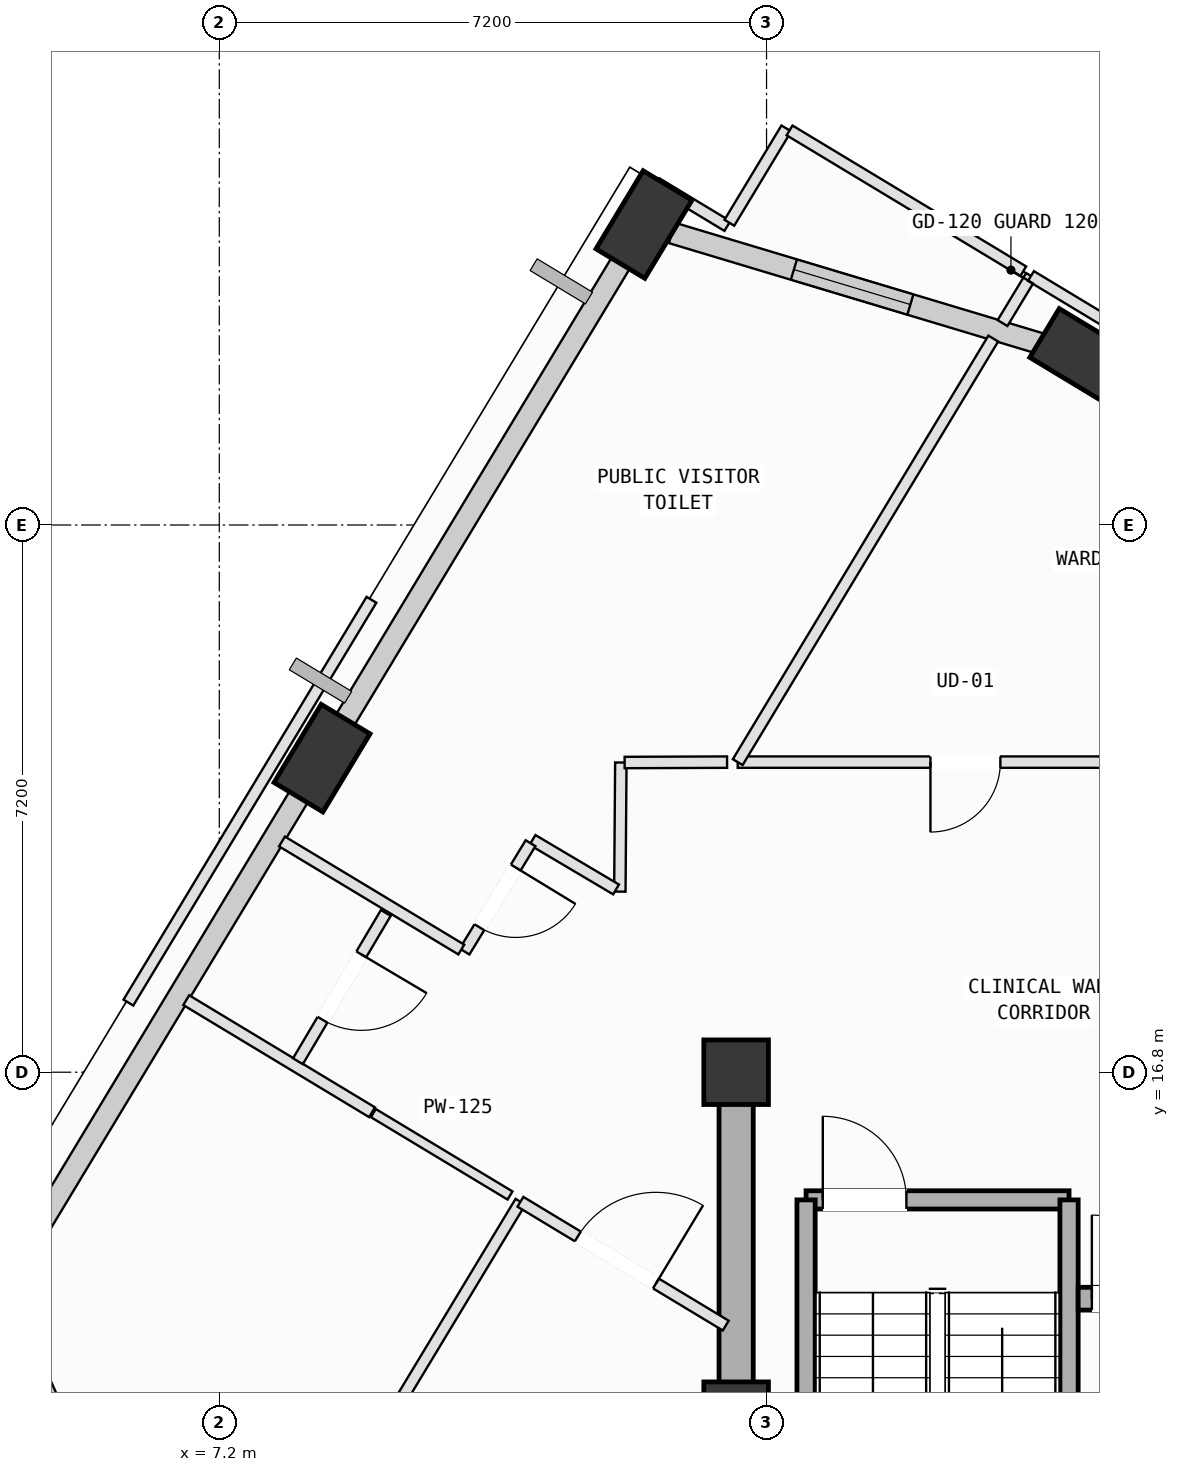
"""IFC4 building model, lengths in metres.
Left out: names, types, materials, properties, quantities, classifications, styles, units other than length and angle.
Written with IfcOpenShell. Run it as: python <this file> out.ifc"""

import sys

from ifc_helpers import new_model, si_unit, direction, frame, frame_2d, origin, origin_2d, place, context, subcontext, project, spatial, rectangle, extrude, element, fill, save


model = new_model("IFC4")
c1 = context("Model", 3, precision=1e-05, world=origin(), true_north=direction((0.0, 1.0)))
c2 = subcontext(c1, "Body", "Model", "MODEL_VIEW")
j1 = project(units=[si_unit("LENGTHUNIT", "METRE"), si_unit("PLANEANGLEUNIT", "RADIAN")], contexts=[c1])
p1 = place(None, origin())
s1 = spatial("IfcSite", under=j1, at=p1, CompositionType="ELEMENT")
p2 = place(p1, origin())
s2 = spatial("IfcBuilding", under=s1, at=p2, CompositionType="ELEMENT")
p3 = place(p2, frame((0.0, 0.0, 276.6)))
s3 = spatial("IfcBuildingStorey", under=s2, at=p3, CompositionType="ELEMENT", Elevation=276.6)
for number, where, z_axis, x_axis in (
    (1, (14.0, 12.3, 0.0), (0.0, 0.0, 1.0), (1.0, 0.0, 0.0)),
    (2, (14.0, 16.8, 0.0), (0.0, 0.0, 1.0), (1.0, 0.0, 0.0)),
):
    element("IfcColumn", number, at=place(p3, frame(where, z_axis=z_axis, x_axis=x_axis)), inside=s3, PredefinedType="COLUMN", context=c2, shape_type="SweptSolid", body=[
        extrude(rectangle(XDim=0.85, YDim=0.85, at=origin_2d()), origin(), (0.0, 0.0, 1.0), 4.0),
    ])
p4 = place(p3, frame((18.572, 26.216, 0.002), z_axis=(-0.005365511084, -0.062252122912, 0.998046033249), x_axis=(-0.808835316802, 0.58714886204, 0.032274511593)))
e3 = element("IfcColumn", 3, at=p4, inside=s3, PredefinedType="COLUMN", context=c2, shape_type="SweptSolid", body=[
    extrude(rectangle(XDim=1.2, YDim=0.75, at=origin_2d()), origin(), (0.0, 0.0, 1.0), 4.004),
])
p5 = place(p3, frame((12.788, 27.953, 0.002), z_axis=(-0.012354535115, -0.086055727352, 0.99621372067), x_axis=(0.632512293176, 0.77096469475, 0.0744421818)))
e4 = element("IfcColumn", 4, at=p5, inside=s3, PredefinedType="COLUMN", context=c2, shape_type="SweptSolid", body=[
    extrude(rectangle(XDim=1.2, YDim=0.75, at=origin_2d()), origin(), (0.0, 0.0, 1.0), 4.011),
])
p6 = place(p3, frame((8.552, 20.932, 0.002), z_axis=(0.016768790587, -0.103164516003, 0.99452294609), x_axis=(0.373216251876, 0.923417643905, 0.089495722025)))
e5 = element("IfcColumn", 5, at=p6, inside=s3, PredefinedType="COLUMN", context=c2, shape_type="SweptSolid", body=[
    extrude(rectangle(XDim=1.2, YDim=0.75, at=origin_2d()), origin(), (0.0, 0.0, 1.0), 4.018),
])
p7 = place(p3, frame((13.156, 27.843, 0.0), z_axis=(0.0, 0.0, 1.0), x_axis=(0.957728653831, -0.287673122885, 0.0)))
e6 = element("IfcWall", 6, at=p7, inside=s3, PredefinedType="SOLIDWALL", context=c2, shape_type="SweptSolid", body=[
    extrude(rectangle(XDim=5.302, YDim=0.28, at=frame_2d((2.651, 0.0))), origin(), (0.0, 0.0, 1.0), 3.265),
])
p8 = place(p7, frame((1.676, 0.0, 0.75)))
e7 = element("IfcOpeningElement", 7, at=p8, cuts=e6, PredefinedType="OPENING", context=c2, shape_type="SweptSolid", body=[
    extrude(rectangle(XDim=1.6, YDim=1.95, at=frame_2d((0.8, 0.975))), frame((0.0, 0.15, 0.0), z_axis=(0.0, -1.0, 0.0), x_axis=(1.0, 0.0, 0.0)), (0.0, 0.0, 1.0), 0.3),
])
p9 = place(p3, frame((8.662, 21.115, 0.0), z_axis=(0.0, 0.0, 1.0), x_axis=(0.516537123798, 0.85626479534, 0.0)))
e8 = element("IfcWall", 8, at=p9, inside=s3, PredefinedType="SOLIDWALL", context=c2, shape_type="SweptSolid", body=[
    extrude(rectangle(XDim=7.434, YDim=0.28, at=frame_2d((3.717, 0.0))), origin(), (0.0, 0.0, 1.0), 3.265),
])
p10 = place(p3, frame((4.41, 14.066, 0.0), z_axis=(0.0, 0.0, 1.0), x_axis=(0.516542521572, 0.856261539138, 0.0)))
e9 = element("IfcWall", 9, at=p10, inside=s3, PredefinedType="SOLIDWALL", context=c2, shape_type="SweptSolid", body=[
    extrude(rectangle(XDim=7.485, YDim=0.28, at=frame_2d((3.742, 0.0))), origin(), (0.0, 0.0, 1.0), 3.265),
])
p11 = place(p3, frame((6.351, 9.273, 0.0), z_axis=(0.0, 0.0, 1.0), x_axis=(-0.401698979628, 0.91577176729, 0.0)))
e10 = element("IfcWall", 10, at=p11, inside=s3, PredefinedType="SOLIDWALL", context=c2, shape_type="SweptSolid", body=[
    extrude(rectangle(XDim=4.408, YDim=0.28, at=frame_2d((2.204, 0.0))), origin(), (0.0, 0.0, 1.0), 3.265),
])
p12 = place(p3, frame((14.92, 15.12, 0.0), z_axis=(0.0, 0.0, 1.0), x_axis=(1.0, 0.0, 0.0)))
e11 = element("IfcWall", 11, at=p12, inside=s3, PredefinedType="SOLIDWALL", context=c2, shape_type="SweptSolid", body=[
    extrude(rectangle(XDim=3.46, YDim=0.24, at=frame_2d((1.73, 0.0))), origin(), (0.0, 0.0, 1.0), 3.78),
])
p13 = place(p12, frame((0.22, 0.0, 0.0)))
e12 = element("IfcOpeningElement", 12, at=p13, cuts=e11, PredefinedType="OPENING", context=c2, shape_type="SweptSolid", body=[
    extrude(rectangle(XDim=1.1, YDim=2.15, at=frame_2d((0.55, 1.075))), frame((0.0, 0.13, 0.0), z_axis=(0.0, -1.0, 0.0), x_axis=(1.0, 0.0, 0.0)), (0.0, 0.0, 1.0), 0.26),
])
for number, where, z_axis, x_axis in (
    (13, (18.38, 15.12, 0.0), (0.0, 0.0, 1.0), (0.0, -1.0, 0.0)),
    (14, (14.92, 8.025, 0.0), (0.0, 0.0, 1.0), (0.0, 1.0, 0.0)),
):
    element("IfcWall", number, at=place(p3, frame(where, z_axis=z_axis, x_axis=x_axis)), inside=s3, PredefinedType="SOLIDWALL", context=c2, shape_type="SweptSolid", body=[
        extrude(rectangle(XDim=7.095, YDim=0.24, at=frame_2d((3.548, 0.0))), origin(), (0.0, 0.0, 1.0), 3.78),
    ])
p14 = place(p3, frame((14.0, 16.8, 0.0), z_axis=(0.0, 0.0, 1.0), x_axis=(0.0, -1.0, 0.0)))
e15 = element("IfcWall", 15, at=p14, inside=s3, PredefinedType="SHEAR", context=c2, shape_type="SweptSolid", body=[
    extrude(rectangle(XDim=9.0, YDim=0.45, at=frame_2d((4.5, 0.0))), origin(), (0.0, 0.0, 1.0), 3.78),
])
p15 = place(p3, frame((18.5, 13.82, 0.0), z_axis=(0.0, 0.0, 1.0), x_axis=(1.0, 0.0, 0.0)))
e16 = element("IfcWall", 16, at=p15, inside=s3, PredefinedType="SOLIDWALL", context=c2, shape_type="SweptSolid", body=[
    extrude(rectangle(XDim=5.3, YDim=0.3, at=frame_2d((2.65, 0.0))), origin(), (0.0, 0.0, 1.0), 3.78),
])
p16 = place(p15, frame((0.18, 0.0, 0.0)))
e17 = element("IfcOpeningElement", 17, at=p16, cuts=e16, PredefinedType="OPENING", context=c2, shape_type="SweptSolid", body=[
    extrude(rectangle(XDim=1.1, YDim=2.15, at=frame_2d((0.55, 1.075))), frame((0.0, 0.16, 0.0), z_axis=(0.0, -1.0, 0.0), x_axis=(1.0, 0.0, 0.0)), (0.0, 0.0, 1.0), 0.32),
])
p17 = place(p3, frame((7.321, 8.729, 0.0), z_axis=(0.0, 0.0, 1.0), x_axis=(0.516618899953, 0.856215458989, 0.0)))
e18 = element("IfcWall", 18, at=p17, inside=s3, PredefinedType="PARTITIONING", context=c2, shape_type="SweptSolid", body=[
    extrude(rectangle(XDim=7.435, YDim=0.15, at=frame_2d((3.718, 0.0))), origin(), (0.0, 0.0, 1.0), 3.78),
])
p18 = place(p3, frame((11.162, 15.095, 0.0), z_axis=(0.0, 0.0, 1.0), x_axis=(0.85632282347, -0.516440918213, 0.0)))
e19 = element("IfcWall", 19, at=p18, inside=s3, PredefinedType="PARTITIONING", context=c2, shape_type="SweptSolid", body=[
    extrude(rectangle(XDim=3.154, YDim=0.15, at=frame_2d((1.577, 0.0))), origin(), (0.0, 0.0, 1.0), 3.78),
])
p19 = place(p18, frame((0.882, 0.0, 0.0)))
e20 = element("IfcOpeningElement", 20, at=p19, cuts=e19, PredefinedType="OPENING", context=c2, shape_type="SweptSolid", body=[
    extrude(rectangle(XDim=1.2, YDim=2.15, at=frame_2d((0.6, 1.075))), frame((0.0, 0.085, 0.0), z_axis=(0.0, -1.0, 0.0), x_axis=(1.0, 0.0, 0.0)), (0.0, 0.0, 1.0), 0.17),
])
p20 = place(p3, frame((6.765, 17.748, 0.0), z_axis=(0.0, 0.0, 1.0), x_axis=(0.856245690324, -0.516568792904, 0.0)))
e21 = element("IfcWall", 21, at=p20, inside=s3, PredefinedType="PARTITIONING", context=c2, shape_type="SweptSolid", body=[
    extrude(rectangle(XDim=2.855, YDim=0.15, at=frame_2d((1.428, 0.0))), origin(), (0.0, 0.0, 1.0), 3.78),
])
p21 = place(p3, frame((9.227, 16.262, 0.0), z_axis=(0.0, 0.0, 1.0), x_axis=(0.856382731236, -0.516341570707, 0.0)))
e22 = element("IfcWall", 22, at=p21, inside=s3, PredefinedType="PARTITIONING", context=c2, shape_type="SweptSolid", body=[
    extrude(rectangle(XDim=2.099, YDim=0.125, at=frame_2d((1.05, 0.0))), origin(), (0.0, 0.0, 1.0), 3.78),
])
p22 = place(p3, frame((20.012, 20.88, 0.0), z_axis=(0.0, 0.0, 1.0), x_axis=(-1.0, 0.0, 0.0)))
e23 = element("IfcWall", 23, at=p22, inside=s3, PredefinedType="PARTITIONING", context=c2, shape_type="SweptSolid", body=[
    extrude(rectangle(XDim=5.991, YDim=0.15, at=frame_2d((2.996, 0.0))), origin(), (0.0, 0.0, 1.0), 3.415),
])
p23 = place(p22, frame((2.535, 0.0, 0.0)))
e24 = element("IfcOpeningElement", 24, at=p23, cuts=e23, PredefinedType="OPENING", context=c2, shape_type="SweptSolid", body=[
    extrude(rectangle(XDim=0.92, YDim=2.1, at=frame_2d((0.46, 1.05))), frame((0.0, 0.085, 0.0), z_axis=(0.0, -1.0, 0.0), x_axis=(1.0, 0.0, 0.0)), (0.0, 0.0, 1.0), 0.17),
])
p24 = place(p3, frame((14.021, 20.88, 0.0), z_axis=(0.0, 0.0, 1.0), x_axis=(0.516557344827, 0.856252596788, 0.0)))
e25 = element("IfcWall", 25, at=p24, inside=s3, PredefinedType="PARTITIONING", context=c2, shape_type="SweptSolid", body=[
    extrude(rectangle(XDim=6.509, YDim=0.15, at=frame_2d((3.254, 0.0))), origin(), (0.0, 0.0, 1.0), 3.78),
])
p25 = place(p3, frame((17.505, 26.657, 0.0), z_axis=(0.0, 0.0, 1.0), x_axis=(0.517223843864, 0.855850159396, 0.0)))
e26 = element("IfcWall", 26, at=p25, inside=s3, PredefinedType="PARTITIONING", context=c2, shape_type="SweptSolid", body=[
    extrude(rectangle(XDim=0.723, YDim=0.15, at=frame_2d((0.362, 0.0))), origin(), (0.0, 0.0, 1.0), 3.78),
])
p26 = place(p3, frame((17.879, 27.276, 0.0), z_axis=(0.0, 0.0, 1.0), x_axis=(0.856281286362, -0.516509785605, 0.0)))
e27 = element("IfcWall", 27, at=p26, inside=s3, PredefinedType="PARTITIONING", context=c2, shape_type="SweptSolid", body=[
    extrude(rectangle(XDim=5.13, YDim=0.15, at=frame_2d((2.565, 0.0))), origin(), (0.0, 0.0, 1.0), 3.78),
])
p27 = place(p3, frame((12.483, 20.875, 0.0), z_axis=(0.0, 0.0, 1.0), x_axis=(-0.007615815916, -0.999970999253, 0.0)))
e28 = element("IfcWall", 28, at=p27, inside=s3, PredefinedType="PARTITIONING", context=c2, shape_type="SweptSolid", body=[
    extrude(rectangle(XDim=1.699, YDim=0.15, at=frame_2d((0.85, 0.0))), origin(), (0.0, 0.0, 1.0), 3.78),
])
p28 = place(p3, frame((12.42, 19.205, 0.0), z_axis=(0.0, 0.0, 1.0), x_axis=(-0.860397088121, 0.509624225046, 0.0)))
e29 = element("IfcWall", 29, at=p28, inside=s3, PredefinedType="PARTITIONING", context=c2, shape_type="SweptSolid", body=[
    extrude(rectangle(XDim=1.277, YDim=0.15, at=frame_2d((0.639, 0.0))), origin(), (0.0, 0.0, 1.0), 3.78),
])
p29 = place(p3, frame((11.295, 19.813, 0.0), z_axis=(0.0, 0.0, 1.0), x_axis=(-0.520165097053, -0.854065730379, 0.0)))
e30 = element("IfcWall", 30, at=p29, inside=s3, PredefinedType="PARTITIONING", context=c2, shape_type="SweptSolid", body=[
    extrude(rectangle(XDim=1.668, YDim=0.15, at=frame_2d((0.834, 0.0))), origin(), (0.0, 0.0, 1.0), 3.78),
])
p30 = place(p29, frame((0.374, 0.0, 0.0)))
e31 = element("IfcOpeningElement", 31, at=p30, cuts=e30, PredefinedType="OPENING", context=c2, shape_type="SweptSolid", body=[
    extrude(rectangle(XDim=0.92, YDim=2.1, at=frame_2d((0.46, 1.05))), frame((0.0, 0.085, 0.0), z_axis=(0.0, -1.0, 0.0), x_axis=(1.0, 0.0, 0.0)), (0.0, 0.0, 1.0), 0.17),
])
p31 = place(p3, frame((10.384, 18.414, 0.0), z_axis=(0.0, 0.0, 1.0), x_axis=(-0.856466725224, 0.516202236128, 0.0)))
e32 = element("IfcWall", 32, at=p31, inside=s3, PredefinedType="PARTITIONING", context=c2, shape_type="SweptSolid", body=[
    extrude(rectangle(XDim=2.754, YDim=0.15, at=frame_2d((1.377, 0.0))), origin(), (0.0, 0.0, 1.0), 3.78),
])
p32 = place(p3, frame((8.114, 20.573, 0.0), z_axis=(0.0, 0.0, 1.0), x_axis=(0.515553046822, 0.856857663742, 0.0)))
e33 = element("IfcWall", 33, at=p32, inside=s3, PredefinedType="PARTITIONING", context=c2, shape_type="SweptSolid", body=[
    extrude(rectangle(XDim=0.747, YDim=0.15, at=frame_2d((0.374, 0.0))), origin(), (0.0, 0.0, 1.0), 3.78),
])
p33 = place(p3, frame((12.339, 27.579, 0.0), z_axis=(0.0, 0.0, 1.0), x_axis=(0.516838479701, 0.856082931672, 0.0)))
e34 = element("IfcWall", 34, at=p33, inside=s3, PredefinedType="PARTITIONING", context=c2, shape_type="SweptSolid", body=[
    extrude(rectangle(XDim=1.103, YDim=0.15, at=frame_2d((0.551, 0.0))), origin(), (0.0, 0.0, 1.0), 3.265),
])
p34 = place(p3, frame((12.952, 28.497, 0.0), z_axis=(0.0, 0.0, 1.0), x_axis=(0.8562252486, -0.516602674848, 0.0)))
e35 = element("IfcWall", 35, at=p34, inside=s3, PredefinedType="PARTITIONING", context=c2, shape_type="SweptSolid", body=[
    extrude(rectangle(XDim=1.09, YDim=0.15, at=frame_2d((0.545, 0.0))), origin(), (0.0, 0.0, 1.0), 3.78),
])
p35 = place(p3, frame((13.911, 27.977, 0.0), z_axis=(0.0, 0.0, 1.0), x_axis=(0.516747988371, 0.856137557005, 0.0)))
e36 = element("IfcWall", 36, at=p35, inside=s3, PredefinedType="PARTITIONING", context=c2, shape_type="SweptSolid", body=[
    extrude(rectangle(XDim=1.449, YDim=0.15, at=frame_2d((0.725, 0.0))), origin(), (0.0, 0.0, 1.0), 3.78),
])
p36 = place(p3, frame((14.703, 29.192, 0.0), z_axis=(0.0, 0.0, 1.0), x_axis=(0.856326634789, -0.516434598522, 0.0)))
e37 = element("IfcWall", 37, at=p36, inside=s3, PredefinedType="PARTITIONING", context=c2, shape_type="SweptSolid", body=[
    extrude(rectangle(XDim=3.59, YDim=0.15, at=frame_2d((1.795, 0.0))), origin(), (0.0, 0.0, 1.0), 3.78),
])
p37 = place(p3, frame((13.881, 20.88, 0.0), z_axis=(0.0, 0.0, 1.0), x_axis=(-0.999993441071, -0.003621852376, 0.0)))
e38 = element("IfcWall", 38, at=p37, inside=s3, PredefinedType="PARTITIONING", context=c2, shape_type="SweptSolid", body=[
    extrude(rectangle(XDim=1.348, YDim=0.15, at=frame_2d((0.674, 0.0))), origin(), (0.0, 0.0, 1.0), 3.78),
])
p38 = place(p3, frame((9.391, 18.896, 0.0), z_axis=(0.0, 0.0, 1.0), x_axis=(-0.509769928001, -0.860310769726, 0.0)))
e39 = element("IfcWall", 39, at=p38, inside=s3, PredefinedType="PARTITIONING", context=c2, shape_type="SweptSolid", body=[
    extrude(rectangle(XDim=2.268, YDim=0.15, at=frame_2d((1.134, 0.0))), origin(), (0.0, 0.0, 1.0), 3.78),
])
p39 = place(p38, frame((0.634, 0.0, 0.0)))
e40 = element("IfcOpeningElement", 40, at=p39, cuts=e39, PredefinedType="OPENING", context=c2, shape_type="SweptSolid", body=[
    extrude(rectangle(XDim=1.0, YDim=2.12, at=frame_2d((0.5, 1.06))), frame((0.0, 0.085, 0.0), z_axis=(0.0, -1.0, 0.0), x_axis=(1.0, 0.0, 0.0)), (0.0, 0.0, 1.0), 0.17),
])
p40 = place(p3, frame((6.004, 17.716, 0.0), z_axis=(0.0, 0.0, 1.0), x_axis=(0.51662857817, 0.856209619321, 0.0)))
e41 = element("IfcWall", 41, at=p40, inside=s3, PredefinedType="PARTITIONING", context=c2, shape_type="SweptSolid", body=[
    extrude(rectangle(XDim=6.19, YDim=0.15, at=frame_2d((3.095, 0.0))), origin(), (0.0, 0.0, 1.0), 3.78),
])
p41 = place(p8, origin())
e42 = element("IfcWindow", 42, at=p41, inside=s3, PartitioningType="SINGLE_PANEL", PredefinedType="WINDOW", context=c2, shape_type="SweptSolid", body=[
    extrude(rectangle(XDim=1.6, YDim=1.95, at=frame_2d((0.8, 0.975))), frame((0.0, 0.03, 0.0), z_axis=(0.0, -1.0, 0.0), x_axis=(1.0, 0.0, 0.0)), (0.0, 0.0, 1.0), 0.06),
])
fill(e7, e42)
p42 = place(p13, origin())
e43 = element("IfcDoor", 43, at=p42, inside=s3, OperationType="SINGLE_SWING_LEFT", PredefinedType="DOOR", context=c2, shape_type="SweptSolid", body=[
    extrude(rectangle(XDim=1.1, YDim=2.15, at=frame_2d((0.55, 1.075))), frame((0.0, 0.025, 0.0), z_axis=(0.0, -1.0, 0.0), x_axis=(1.0, 0.0, 0.0)), (0.0, 0.0, 1.0), 0.05),
])
fill(e12, e43)
p43 = place(p16, origin())
e44 = element("IfcDoor", 44, at=p43, inside=s3, OperationType="SINGLE_SWING_LEFT", PredefinedType="DOOR", context=c2, shape_type="SweptSolid", body=[
    extrude(rectangle(XDim=1.1, YDim=2.15, at=frame_2d((0.55, 1.075))), frame((0.0, 0.025, 0.0), z_axis=(0.0, -1.0, 0.0), x_axis=(1.0, 0.0, 0.0)), (0.0, 0.0, 1.0), 0.05),
])
fill(e17, e44)
p44 = place(p19, origin())
e45 = element("IfcDoor", 45, at=p44, inside=s3, OperationType="SINGLE_SWING_RIGHT", PredefinedType="DOOR", context=c2, shape_type="SweptSolid", body=[
    extrude(rectangle(XDim=1.2, YDim=2.15, at=frame_2d((0.6, 1.075))), frame((0.0, 0.025, 0.0), z_axis=(0.0, -1.0, 0.0), x_axis=(1.0, 0.0, 0.0)), (0.0, 0.0, 1.0), 0.05),
])
fill(e20, e45)
p45 = place(p23, origin())
e46 = element("IfcDoor", 46, at=p45, inside=s3, OperationType="SINGLE_SWING_RIGHT", PredefinedType="DOOR", context=c2, shape_type="SweptSolid", body=[
    extrude(rectangle(XDim=0.92, YDim=2.1, at=frame_2d((0.46, 1.05))), frame((0.0, 0.025, 0.0), z_axis=(0.0, -1.0, 0.0), x_axis=(1.0, 0.0, 0.0)), (0.0, 0.0, 1.0), 0.05),
])
fill(e24, e46)
p46 = place(p30, origin())
e47 = element("IfcDoor", 47, at=p46, inside=s3, OperationType="SINGLE_SWING_LEFT", PredefinedType="DOOR", context=c2, shape_type="SweptSolid", body=[
    extrude(rectangle(XDim=0.92, YDim=2.1, at=frame_2d((0.46, 1.05))), frame((0.0, 0.025, 0.0), z_axis=(0.0, -1.0, 0.0), x_axis=(1.0, 0.0, 0.0)), (0.0, 0.0, 1.0), 0.05),
])
fill(e31, e47)
p47 = place(p39, origin())
e48 = element("IfcDoor", 48, at=p47, inside=s3, OperationType="SINGLE_SWING_LEFT", PredefinedType="DOOR", context=c2, shape_type="SweptSolid", body=[
    extrude(rectangle(XDim=1.0, YDim=2.12, at=frame_2d((0.5, 1.06))), frame((0.0, 0.025, 0.0), z_axis=(0.0, -1.0, 0.0), x_axis=(1.0, 0.0, 0.0)), (0.0, 0.0, 1.0), 0.05),
])
fill(e40, e48)
save(model, sys.argv[1])
